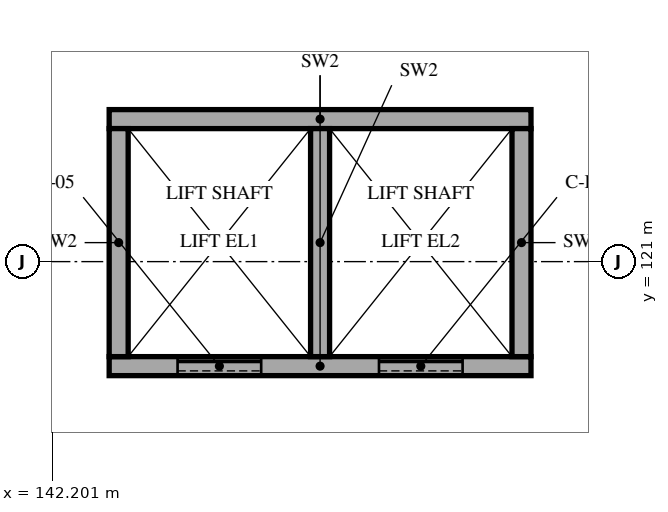
"""IFC4 building model, lengths in metres.
Left out: names, types, materials, properties, quantities, classifications, styles, units other than length and angle.
Written with IfcOpenShell. Run it as: python <this file> out.ifc"""

import sys

from ifc_helpers import new_model, si_unit, direction, frame, frame_2d, origin, place, context, subcontext, project, spatial, rectangle, extrude, element, fill, save


model = new_model("IFC4")
c1 = context("Model", 3, precision=1e-05, world=origin(), true_north=direction((0.0, 1.0)))
c2 = subcontext(c1, "Body", "Model", "MODEL_VIEW")
j1 = project(units=[si_unit("LENGTHUNIT", "METRE"), si_unit("PLANEANGLEUNIT", "RADIAN")], contexts=[c1])
p1 = place(None, origin())
s1 = spatial("IfcSite", under=j1, at=p1, CompositionType="ELEMENT")
p2 = place(p1, origin())
s2 = spatial("IfcBuilding", under=s1, at=p2, CompositionType="ELEMENT")
p3 = place(p2, frame((0.0, 0.0, 15.0)))
s3 = spatial("IfcBuildingStorey", under=s2, at=p3, CompositionType="ELEMENT", Elevation=15.0)
p4 = place(p3, frame((142.95, 119.625, 0.0), z_axis=(0.0, 0.0, 1.0), x_axis=(1.0, 0.0, 0.0)))
e1 = element("IfcWall", 1, at=p4, inside=s3, PredefinedType="SHEAR", context=c2, shape_type="SweptSolid", body=[
    extrude(rectangle(XDim=5.55, YDim=0.25, at=frame_2d((2.775, 0.0))), origin(), (0.0, 0.0, 1.0), 4.2),
])
p5 = place(p4, frame((0.9, 0.0, 0.0)))
e2 = element("IfcOpeningElement", 2, at=p5, cuts=e1, PredefinedType="OPENING", context=c2, shape_type="SweptSolid", body=[
    extrude(rectangle(XDim=1.1, YDim=2.1, at=frame_2d((0.55, 1.05))), frame((0.0, 0.135, 0.0), z_axis=(0.0, -1.0, 0.0), x_axis=(1.0, 0.0, 0.0)), (0.0, 0.0, 1.0), 0.27),
])
p6 = place(p4, frame((3.55, 0.0, 0.0)))
e3 = element("IfcOpeningElement", 3, at=p6, cuts=e1, PredefinedType="OPENING", context=c2, shape_type="SweptSolid", body=[
    extrude(rectangle(XDim=1.1, YDim=2.1, at=frame_2d((0.55, 1.05))), frame((0.0, 0.135, 0.0), z_axis=(0.0, -1.0, 0.0), x_axis=(1.0, 0.0, 0.0)), (0.0, 0.0, 1.0), 0.27),
])
p7 = place(p3, frame((142.95, 122.875, 0.0), z_axis=(0.0, 0.0, 1.0), x_axis=(1.0, 0.0, 0.0)))
e4 = element("IfcWall", 4, at=p7, inside=s3, PredefinedType="SHEAR", context=c2, shape_type="SweptSolid", body=[
    extrude(rectangle(XDim=5.55, YDim=0.25, at=frame_2d((2.775, 0.0))), origin(), (0.0, 0.0, 1.0), 4.2),
])
for number, where, z_axis, x_axis in (
    (5, (143.075, 119.75, 0.0), (0.0, 0.0, 1.0), (0.0, 1.0, 0.0)),
    (6, (148.375, 119.75, 0.0), (0.0, 0.0, 1.0), (0.0, 1.0, 0.0)),
    (7, (145.725, 119.75, 0.0), (0.0, 0.0, 1.0), (0.0, 1.0, 0.0)),
):
    element("IfcWall", number, at=place(p3, frame(where, z_axis=z_axis, x_axis=x_axis)), inside=s3, PredefinedType="SHEAR", context=c2, shape_type="SweptSolid", body=[
        extrude(rectangle(XDim=3.0, YDim=0.25, at=frame_2d((1.5, 0.0))), origin(), (0.0, 0.0, 1.0), 4.2),
    ])
p8 = place(p5, origin())
e8 = element("IfcDoor", 8, at=p8, inside=s3, OperationType="DOUBLE_DOOR_SLIDING", PredefinedType="NOTDEFINED", context=c2, shape_type="SweptSolid", body=[
    extrude(rectangle(XDim=1.1, YDim=2.1, at=frame_2d((0.55, 1.05))), frame((0.0, 0.025, 0.0), z_axis=(0.0, -1.0, 0.0), x_axis=(1.0, 0.0, 0.0)), (0.0, 0.0, 1.0), 0.05),
])
fill(e2, e8)
p9 = place(p6, origin())
e9 = element("IfcDoor", 9, at=p9, inside=s3, OperationType="DOUBLE_DOOR_SLIDING", PredefinedType="NOTDEFINED", context=c2, shape_type="SweptSolid", body=[
    extrude(rectangle(XDim=1.1, YDim=2.1, at=frame_2d((0.55, 1.05))), frame((0.0, 0.025, 0.0), z_axis=(0.0, -1.0, 0.0), x_axis=(1.0, 0.0, 0.0)), (0.0, 0.0, 1.0), 0.05),
])
fill(e3, e9)
save(model, sys.argv[1])
